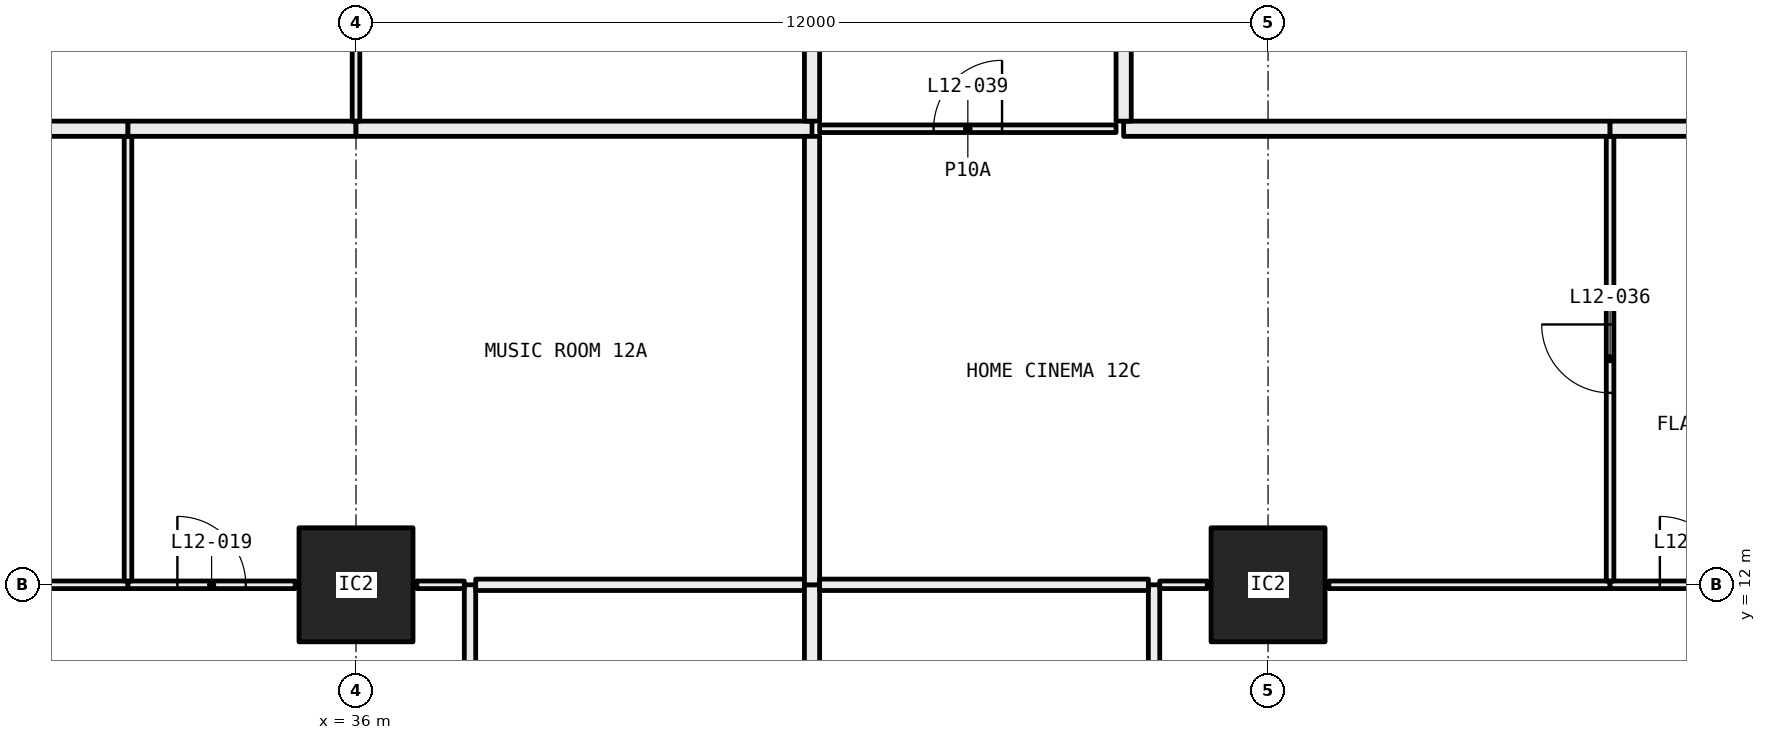
"""IFC4 building model, lengths in metres.
Left out: names, types, materials, properties, quantities, classifications, styles, units other than length and angle.
Written with IfcOpenShell. Run it as: python <this file> out.ifc"""

import sys

from ifc_helpers import new_model, si_unit, direction, frame, frame_2d, origin, origin_2d, place, context, subcontext, project, spatial, rectangle, hollow_rectangle, extrude, element, fill, save


model = new_model("IFC4")
c1 = context("Model", 3, precision=1e-05, world=origin(), true_north=direction((0.0, 1.0)))
c2 = subcontext(c1, "Body", "Model", "MODEL_VIEW")
j1 = project(units=[si_unit("LENGTHUNIT", "METRE"), si_unit("PLANEANGLEUNIT", "RADIAN")], contexts=[c1])
p1 = place(None, origin())
s1 = spatial("IfcSite", under=j1, at=p1, CompositionType="ELEMENT")
p2 = place(p1, origin())
s2 = spatial("IfcBuilding", under=s1, at=p2, CompositionType="ELEMENT")
p3 = place(p2, frame((0.0, 0.0, 54.15)))
s3 = spatial("IfcBuildingStorey", under=s2, at=p3, CompositionType="ELEMENT", Elevation=54.15)
for number, where, z_axis, x_axis in (
    (1, (36.0, 12.0, 0.0), (0.0, 0.0, 1.0), (1.0, 0.0, 0.0)),
    (2, (48.0, 12.0, 0.0), (0.0, 0.0, 1.0), (1.0, 0.0, 0.0)),
):
    element("IfcColumn", number, at=place(p3, frame(where, z_axis=z_axis, x_axis=x_axis)), inside=s3, PredefinedType="COLUMN", context=c2, shape_type="SweptSolid", body=[
        extrude(hollow_rectangle(XDim=1.5, YDim=1.5, WallThickness=0.065, at=origin_2d()), origin(), (0.0, 0.0, 1.0), 3.05),
    ])
p4 = place(p3, frame((37.5, 9.0, 0.0), z_axis=(0.0, 0.0, 1.0), x_axis=(0.0, 1.0, 0.0)))
e3 = element("IfcWall", 3, at=p4, inside=s3, PredefinedType="PARTITIONING", context=c2, shape_type="SweptSolid", body=[
    extrude(rectangle(XDim=3.0, YDim=0.15, at=frame_2d((1.5, 0.0))), origin(), (0.0, 0.0, 1.0), 2.45),
])
p5 = place(p4, frame((1.05, 0.0, 0.0)))
e4 = element("IfcOpeningElement", 4, at=p5, cuts=e3, PredefinedType="OPENING", context=c2, shape_type="SweptSolid", body=[
    extrude(rectangle(XDim=0.9, YDim=2.1, at=frame_2d((0.45, 1.05))), frame((0.0, 0.085, 0.0), z_axis=(0.0, -1.0, 0.0), x_axis=(1.0, 0.0, 0.0)), (0.0, 0.0, 1.0), 0.17),
])
p6 = place(p3, frame((33.0, 12.0, 0.0), z_axis=(0.0, 0.0, 1.0), x_axis=(-1.0, 0.0, 0.0)))
e5 = element("IfcWall", 5, at=p6, inside=s3, PredefinedType="PARTITIONING", context=c2, shape_type="SweptSolid", body=[
    extrude(rectangle(XDim=4.645, YDim=0.1, at=frame_2d((2.323, 0.0))), origin(), (0.0, 0.0, 1.0), 2.45),
])
p7 = place(p3, frame((35.2, 12.0, 0.0), z_axis=(0.0, 0.0, 1.0), x_axis=(-1.0, 0.0, 0.0)))
e6 = element("IfcWall", 6, at=p7, inside=s3, PredefinedType="PARTITIONING", context=c2, shape_type="SweptSolid", body=[
    extrude(rectangle(XDim=2.2, YDim=0.1, at=frame_2d((1.1, 0.0))), origin(), (0.0, 0.0, 1.0), 2.45),
])
p8 = place(p7, frame((0.65, 0.0, 0.0)))
e7 = element("IfcOpeningElement", 7, at=p8, cuts=e6, PredefinedType="OPENING", context=c2, shape_type="SweptSolid", body=[
    extrude(rectangle(XDim=0.9, YDim=2.1, at=frame_2d((0.45, 1.05))), frame((0.0, 0.06, 0.0), z_axis=(0.0, -1.0, 0.0), x_axis=(1.0, 0.0, 0.0)), (0.0, 0.0, 1.0), 0.12),
])
p9 = place(p3, frame((37.425, 12.0, 0.0), z_axis=(0.0, 0.0, 1.0), x_axis=(-1.0, 0.0, 0.0)))
e8 = element("IfcWall", 8, at=p9, inside=s3, PredefinedType="PARTITIONING", context=c2, shape_type="SweptSolid", body=[
    extrude(rectangle(XDim=0.625, YDim=0.1, at=frame_2d((0.312, 0.0))), origin(), (0.0, 0.0, 1.0), 2.45),
])
p10 = place(p3, frame((41.9, 12.0, 0.0), z_axis=(0.0, 0.0, 1.0), x_axis=(-1.0, 0.0, 0.0)))
e9 = element("IfcWall", 9, at=p10, inside=s3, PredefinedType="PARTITIONING", context=c2, shape_type="SweptSolid", body=[
    extrude(rectangle(XDim=4.325, YDim=0.15, at=frame_2d((2.163, 0.0))), origin(), (0.0, 0.0, 1.0), 2.45),
])
p11 = place(p3, frame((42.0, 9.0, 0.0), z_axis=(0.0, 0.0, 1.0), x_axis=(0.0, 1.0, 0.0)))
e10 = element("IfcWall", 10, at=p11, inside=s3, PredefinedType="PARTITIONING", context=c2, shape_type="SweptSolid", body=[
    extrude(rectangle(XDim=3.0, YDim=0.2, at=frame_2d((1.5, 0.0))), origin(), (0.0, 0.0, 1.0), 2.45),
])
p12 = place(p3, frame((33.0, 12.05, 0.0), z_axis=(0.0, 0.0, 1.0), x_axis=(0.0, 1.0, 0.0)))
e11 = element("IfcWall", 11, at=p12, inside=s3, PredefinedType="PARTITIONING", context=c2, shape_type="SweptSolid", body=[
    extrude(rectangle(XDim=5.85, YDim=0.1, at=frame_2d((2.925, 0.0))), origin(), (0.0, 0.0, 1.0), 2.45),
])
p13 = place(p3, frame((33.0, 18.0, 0.0), z_axis=(0.0, 0.0, 1.0), x_axis=(-1.0, 0.0, 0.0)))
e12 = element("IfcWall", 12, at=p13, inside=s3, PredefinedType="PARTITIONING", context=c2, shape_type="SweptSolid", body=[
    extrude(rectangle(XDim=7.1, YDim=0.2, at=frame_2d((3.55, 0.0))), origin(), (0.0, 0.0, 1.0), 3.05),
])
p14 = place(p3, frame((36.0, 18.0, 0.0), z_axis=(0.0, 0.0, 1.0), x_axis=(-1.0, 0.0, 0.0)))
e13 = element("IfcWall", 13, at=p14, inside=s3, PredefinedType="PARTITIONING", context=c2, shape_type="SweptSolid", body=[
    extrude(rectangle(XDim=3.0, YDim=0.2, at=frame_2d((1.5, 0.0))), origin(), (0.0, 0.0, 1.0), 2.45),
])
p15 = place(p3, frame((42.0, 18.0, 0.0), z_axis=(0.0, 0.0, 1.0), x_axis=(-1.0, 0.0, 0.0)))
e14 = element("IfcWall", 14, at=p15, inside=s3, PredefinedType="PARTITIONING", context=c2, shape_type="SweptSolid", body=[
    extrude(rectangle(XDim=6.0, YDim=0.2, at=frame_2d((3.0, 0.0))), origin(), (0.0, 0.0, 1.0), 2.45),
])
p16 = place(p3, frame((42.0, 12.0, 0.0), z_axis=(0.0, 0.0, 1.0), x_axis=(0.0, 1.0, 0.0)))
e15 = element("IfcWall", 15, at=p16, inside=s3, PredefinedType="PARTITIONING", context=c2, shape_type="SweptSolid", body=[
    extrude(rectangle(XDim=5.9, YDim=0.2, at=frame_2d((2.95, 0.0))), origin(), (0.0, 0.0, 1.0), 2.45),
])
p17 = place(p3, frame((36.0, 18.1, 0.0), z_axis=(0.0, 0.0, 1.0), x_axis=(0.0, 1.0, 0.0)))
e16 = element("IfcWall", 16, at=p17, inside=s3, PredefinedType="PARTITIONING", context=c2, shape_type="SweptSolid", body=[
    extrude(rectangle(XDim=5.1, YDim=0.1, at=frame_2d((2.55, 0.0))), origin(), (0.0, 0.0, 1.0), 2.45),
])
p18 = place(p17, frame((2.1, 0.0, 0.0)))
e17 = element("IfcOpeningElement", 17, at=p18, cuts=e16, PredefinedType="OPENING", context=c2, shape_type="SweptSolid", body=[
    extrude(rectangle(XDim=0.9, YDim=2.1, at=frame_2d((0.45, 1.05))), frame((0.0, 0.06, 0.0), z_axis=(0.0, -1.0, 0.0), x_axis=(1.0, 0.0, 0.0)), (0.0, 0.0, 1.0), 0.12),
])
p19 = place(p3, frame((42.0, 18.1, 0.0), z_axis=(0.0, 0.0, 1.0), x_axis=(0.0, 1.0, 0.0)))
e18 = element("IfcWall", 18, at=p19, inside=s3, PredefinedType="PARTITIONING", context=c2, shape_type="SweptSolid", body=[
    extrude(rectangle(XDim=6.2, YDim=0.2, at=frame_2d((3.1, 0.0))), origin(), (0.0, 0.0, 1.0), 2.45),
])
p20 = place(p3, frame((46.5, 9.075, 0.0), z_axis=(0.0, 0.0, 1.0), x_axis=(0.0, 1.0, 0.0)))
e19 = element("IfcWall", 19, at=p20, inside=s3, PredefinedType="PARTITIONING", context=c2, shape_type="SweptSolid", body=[
    extrude(rectangle(XDim=2.925, YDim=0.15, at=frame_2d((1.462, 0.0))), origin(), (0.0, 0.0, 1.0), 2.45),
])
p21 = place(p20, frame((1.012, 0.0, 0.0)))
e20 = element("IfcOpeningElement", 20, at=p21, cuts=e19, PredefinedType="OPENING", context=c2, shape_type="SweptSolid", body=[
    extrude(rectangle(XDim=0.9, YDim=2.1, at=frame_2d((0.45, 1.05))), frame((0.0, 0.085, 0.0), z_axis=(0.0, -1.0, 0.0), x_axis=(1.0, 0.0, 0.0)), (0.0, 0.0, 1.0), 0.17),
])
p22 = place(p3, frame((46.425, 12.0, 0.0), z_axis=(0.0, 0.0, 1.0), x_axis=(-1.0, 0.0, 0.0)))
e21 = element("IfcWall", 21, at=p22, inside=s3, PredefinedType="PARTITIONING", context=c2, shape_type="SweptSolid", body=[
    extrude(rectangle(XDim=4.325, YDim=0.15, at=frame_2d((2.163, 0.0))), origin(), (0.0, 0.0, 1.0), 2.45),
])
p23 = place(p3, frame((47.2, 12.0, 0.0), z_axis=(0.0, 0.0, 1.0), x_axis=(-1.0, 0.0, 0.0)))
e22 = element("IfcWall", 22, at=p23, inside=s3, PredefinedType="PARTITIONING", context=c2, shape_type="SweptSolid", body=[
    extrude(rectangle(XDim=0.625, YDim=0.1, at=frame_2d((0.312, 0.0))), origin(), (0.0, 0.0, 1.0), 2.45),
])
p24 = place(p3, frame((52.5, 12.0, 0.0), z_axis=(0.0, 0.0, 1.0), x_axis=(-1.0, 0.0, 0.0)))
e23 = element("IfcWall", 23, at=p24, inside=s3, PredefinedType="PARTITIONING", context=c2, shape_type="SweptSolid", body=[
    extrude(rectangle(XDim=3.7, YDim=0.1, at=frame_2d((1.85, 0.0))), origin(), (0.0, 0.0, 1.0), 2.45),
])
p25 = place(p3, frame((54.71, 12.0, 0.0), z_axis=(0.0, 0.0, 1.0), x_axis=(-1.0, 0.0, 0.0)))
e24 = element("IfcWall", 24, at=p25, inside=s3, PredefinedType="PARTITIONING", context=c2, shape_type="SweptSolid", body=[
    extrude(rectangle(XDim=2.21, YDim=0.1, at=frame_2d((1.105, 0.0))), origin(), (0.0, 0.0, 1.0), 2.45),
])
p26 = place(p25, frame((0.655, 0.0, 0.0)))
e25 = element("IfcOpeningElement", 25, at=p26, cuts=e24, PredefinedType="OPENING", context=c2, shape_type="SweptSolid", body=[
    extrude(rectangle(XDim=0.9, YDim=2.1, at=frame_2d((0.45, 1.05))), frame((0.0, 0.06, 0.0), z_axis=(0.0, -1.0, 0.0), x_axis=(1.0, 0.0, 0.0)), (0.0, 0.0, 1.0), 0.12),
])
p27 = place(p3, frame((52.5, 12.05, 0.0), z_axis=(0.0, 0.0, 1.0), x_axis=(0.0, 1.0, 0.0)))
e26 = element("IfcWall", 26, at=p27, inside=s3, PredefinedType="PARTITIONING", context=c2, shape_type="SweptSolid", body=[
    extrude(rectangle(XDim=5.85, YDim=0.1, at=frame_2d((2.925, 0.0))), origin(), (0.0, 0.0, 1.0), 2.45),
])
p28 = place(p27, frame((2.475, 0.0, 0.0)))
e27 = element("IfcOpeningElement", 27, at=p28, cuts=e26, PredefinedType="OPENING", context=c2, shape_type="SweptSolid", body=[
    extrude(rectangle(XDim=0.9, YDim=2.1, at=frame_2d((0.45, 1.05))), frame((0.0, 0.06, 0.0), z_axis=(0.0, -1.0, 0.0), x_axis=(1.0, 0.0, 0.0)), (0.0, 0.0, 1.0), 0.12),
])
p29 = place(p3, frame((46.0, 18.0, 0.0), z_axis=(0.0, 0.0, 1.0), x_axis=(-1.0, 0.0, 0.0)))
e28 = element("IfcWall", 28, at=p29, inside=s3, PredefinedType="PARTITIONING", context=c2, shape_type="SweptSolid", body=[
    extrude(rectangle(XDim=3.9, YDim=0.1, at=frame_2d((1.95, 0.0))), origin(), (0.0, 0.0, 1.0), 3.05),
])
p30 = place(p29, frame((1.5, 0.0, 0.0)))
e29 = element("IfcOpeningElement", 29, at=p30, cuts=e28, PredefinedType="OPENING", context=c2, shape_type="SweptSolid", body=[
    extrude(rectangle(XDim=0.9, YDim=2.1, at=frame_2d((0.45, 1.05))), frame((0.0, 0.06, 0.0), z_axis=(0.0, -1.0, 0.0), x_axis=(1.0, 0.0, 0.0)), (0.0, 0.0, 1.0), 0.12),
])
p31 = place(p3, frame((52.5, 18.0, 0.0), z_axis=(0.0, 0.0, 1.0), x_axis=(-1.0, 0.0, 0.0)))
e30 = element("IfcWall", 30, at=p31, inside=s3, PredefinedType="PARTITIONING", context=c2, shape_type="SweptSolid", body=[
    extrude(rectangle(XDim=6.4, YDim=0.2, at=frame_2d((3.2, 0.0))), origin(), (0.0, 0.0, 1.0), 3.05),
])
p32 = place(p3, frame((57.0, 18.0, 0.0), z_axis=(0.0, 0.0, 1.0), x_axis=(-1.0, 0.0, 0.0)))
e31 = element("IfcWall", 31, at=p32, inside=s3, PredefinedType="PARTITIONING", context=c2, shape_type="SweptSolid", body=[
    extrude(rectangle(XDim=4.5, YDim=0.2, at=frame_2d((2.25, 0.0))), origin(), (0.0, 0.0, 1.0), 3.05),
])
p33 = place(p32, frame((1.75, 0.0, 0.0)))
e32 = element("IfcOpeningElement", 32, at=p33, cuts=e31, PredefinedType="OPENING", context=c2, shape_type="SweptSolid", body=[
    extrude(rectangle(XDim=1.0, YDim=2.1, at=frame_2d((0.5, 1.05))), frame((0.0, 0.11, 0.0), z_axis=(0.0, -1.0, 0.0), x_axis=(1.0, 0.0, 0.0)), (0.0, 0.0, 1.0), 0.22),
])
p34 = place(p3, frame((46.1, 18.1, 0.0), z_axis=(0.0, 0.0, 1.0), x_axis=(0.0, 1.0, 0.0)))
e33 = element("IfcWall", 33, at=p34, inside=s3, PredefinedType="PARTITIONING", context=c2, shape_type="SweptSolid", body=[
    extrude(rectangle(XDim=6.2, YDim=0.2, at=frame_2d((3.1, 0.0))), origin(), (0.0, 0.0, 1.0), 2.45),
])
p35 = place(p8, frame((0.9, 0.0, 0.0), x_axis=(-1.0, 0.0, 0.0)))
e34 = element("IfcDoor", 34, at=p35, inside=s3, OperationType="SINGLE_SWING_RIGHT", PredefinedType="DOOR", context=c2, shape_type="SweptSolid", body=[
    extrude(rectangle(XDim=0.9, YDim=2.1, at=frame_2d((0.45, 1.05))), frame((0.0, 0.025, 0.0), z_axis=(0.0, -1.0, 0.0), x_axis=(1.0, 0.0, 0.0)), (0.0, 0.0, 1.0), 0.05),
])
fill(e7, e34)
p36 = place(p26, frame((0.9, 0.0, 0.0), x_axis=(-1.0, 0.0, 0.0)))
e35 = element("IfcDoor", 35, at=p36, inside=s3, OperationType="SINGLE_SWING_RIGHT", PredefinedType="DOOR", context=c2, shape_type="SweptSolid", body=[
    extrude(rectangle(XDim=0.9, YDim=2.1, at=frame_2d((0.45, 1.05))), frame((0.0, 0.025, 0.0), z_axis=(0.0, -1.0, 0.0), x_axis=(1.0, 0.0, 0.0)), (0.0, 0.0, 1.0), 0.05),
])
fill(e25, e35)
p37 = place(p28, origin())
e36 = element("IfcDoor", 36, at=p37, inside=s3, OperationType="SINGLE_SWING_LEFT", PredefinedType="DOOR", context=c2, shape_type="SweptSolid", body=[
    extrude(rectangle(XDim=0.9, YDim=2.1, at=frame_2d((0.45, 1.05))), frame((0.0, 0.025, 0.0), z_axis=(0.0, -1.0, 0.0), x_axis=(1.0, 0.0, 0.0)), (0.0, 0.0, 1.0), 0.05),
])
fill(e27, e36)
p38 = place(p30, frame((0.9, 0.0, 0.0), x_axis=(-1.0, 0.0, 0.0)))
e37 = element("IfcDoor", 37, at=p38, inside=s3, OperationType="SINGLE_SWING_LEFT", PredefinedType="DOOR", context=c2, shape_type="SweptSolid", body=[
    extrude(rectangle(XDim=0.9, YDim=2.1, at=frame_2d((0.45, 1.05))), frame((0.0, 0.025, 0.0), z_axis=(0.0, -1.0, 0.0), x_axis=(1.0, 0.0, 0.0)), (0.0, 0.0, 1.0), 0.05),
])
fill(e29, e37)
save(model, sys.argv[1])
